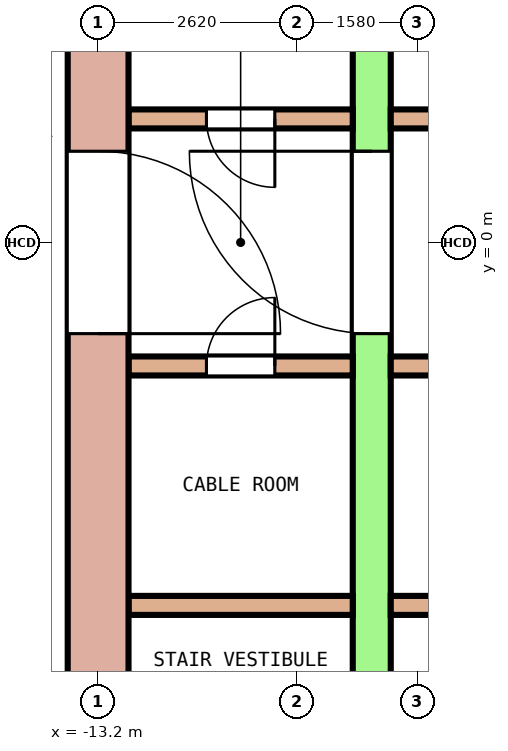
"""IFC4 building model, lengths in metres.
Left out: names, types, materials, properties, quantities, classifications, styles, units other than length and angle.
Written with IfcOpenShell. Run it as: python <this file> out.ifc"""

import sys

from ifc_helpers import new_model, si_unit, direction, frame, frame_2d, origin, place, context, subcontext, project, spatial, rectangle, extrude, element, fill, save


model = new_model("IFC4")
c1 = context("Model", 3, precision=1e-05, world=origin(), true_north=direction((0.0, 1.0)))
c2 = subcontext(c1, "Body", "Model", "MODEL_VIEW")
j1 = project(units=[si_unit("LENGTHUNIT", "METRE"), si_unit("PLANEANGLEUNIT", "RADIAN")], contexts=[c1])
p1 = place(None, origin())
s1 = spatial("IfcSite", under=j1, at=p1, CompositionType="ELEMENT")
p2 = place(p1, origin())
s2 = spatial("IfcBuilding", under=s1, at=p2, CompositionType="ELEMENT")
p3 = place(p2, frame((0.0, 0.0, 135.2)))
s3 = spatial("IfcBuildingStorey", under=s2, at=p3, CompositionType="ELEMENT", Elevation=135.2)
p4 = place(p3, frame((-13.2, -7.7, 0.0), z_axis=(0.0, 0.0, 1.0), x_axis=(0.0, 1.0, 0.0)))
e1 = element("IfcWall", 1, at=p4, inside=s3, PredefinedType="SHEAR", context=c2, shape_type="SweptSolid", body=[
    extrude(rectangle(XDim=15.4, YDim=0.8, at=frame_2d((7.7, 0.0))), origin(), (0.0, 0.0, 1.0), 4.1),
])
p5 = place(p4, frame((6.5, 0.0, 0.0)))
e2 = element("IfcOpeningElement", 2, at=p5, cuts=e1, PredefinedType="OPENING", context=c2, shape_type="SweptSolid", body=[
    extrude(rectangle(XDim=2.4, YDim=2.1, at=frame_2d((1.2, 1.05))), frame((0.0, 0.41, 0.0), z_axis=(0.0, -1.0, 0.0), x_axis=(1.0, 0.0, 0.0)), (0.0, 0.0, 1.0), 0.82),
])
p6 = place(p4, frame((13.4, 0.0, 0.0)))
e3 = element("IfcOpeningElement", 3, at=p6, cuts=e1, PredefinedType="OPENING", context=c2, shape_type="SweptSolid", body=[
    extrude(rectangle(XDim=1.2, YDim=2.1, at=frame_2d((0.6, 1.05))), frame((0.0, 0.41, 0.0), z_axis=(0.0, -1.0, 0.0), x_axis=(1.0, 0.0, 0.0)), (0.0, 0.0, 1.0), 0.82),
])
p7 = place(p4, frame((0.8, 0.0, 0.0)))
e4 = element("IfcOpeningElement", 4, at=p7, cuts=e1, PredefinedType="OPENING", context=c2, shape_type="SweptSolid", body=[
    extrude(rectangle(XDim=1.2, YDim=2.1, at=frame_2d((0.6, 1.05))), frame((0.0, 0.41, 0.0), z_axis=(0.0, -1.0, 0.0), x_axis=(1.0, 0.0, 0.0)), (0.0, 0.0, 1.0), 0.82),
])
p8 = place(p3, frame((-9.6, -7.7, 0.0), z_axis=(0.0, 0.0, 1.0), x_axis=(0.0, 1.0, 0.0)))
e5 = element("IfcWall", 5, at=p8, inside=s3, PredefinedType="SHEAR", context=c2, shape_type="SweptSolid", body=[
    extrude(rectangle(XDim=15.4, YDim=0.5, at=frame_2d((7.7, 0.0))), origin(), (0.0, 0.0, 1.0), 4.1),
])
p9 = place(p8, frame((6.5, 0.0, 0.0)))
e6 = element("IfcOpeningElement", 6, at=p9, cuts=e5, PredefinedType="OPENING", context=c2, shape_type="SweptSolid", body=[
    extrude(rectangle(XDim=2.4, YDim=2.1, at=frame_2d((1.2, 1.05))), frame((0.0, 0.26, 0.0), z_axis=(0.0, -1.0, 0.0), x_axis=(1.0, 0.0, 0.0)), (0.0, 0.0, 1.0), 0.52),
])
p10 = place(p8, frame((13.4, 0.0, 0.0)))
e7 = element("IfcOpeningElement", 7, at=p10, cuts=e5, PredefinedType="OPENING", context=c2, shape_type="SweptSolid", body=[
    extrude(rectangle(XDim=1.2, YDim=2.1, at=frame_2d((0.6, 1.05))), frame((0.0, 0.26, 0.0), z_axis=(0.0, -1.0, 0.0), x_axis=(1.0, 0.0, 0.0)), (0.0, 0.0, 1.0), 0.52),
])
p11 = place(p8, frame((0.8, 0.0, 0.0)))
e8 = element("IfcOpeningElement", 8, at=p11, cuts=e5, PredefinedType="OPENING", context=c2, shape_type="SweptSolid", body=[
    extrude(rectangle(XDim=1.2, YDim=2.1, at=frame_2d((0.6, 1.05))), frame((0.0, 0.26, 0.0), z_axis=(0.0, -1.0, 0.0), x_axis=(1.0, 0.0, 0.0)), (0.0, 0.0, 1.0), 0.52),
])
p12 = place(p3, frame((-12.8, 1.625, 0.0), z_axis=(0.0, 0.0, 1.0), x_axis=(1.0, 0.0, 0.0)))
e9 = element("IfcWall", 9, at=p12, inside=s3, PredefinedType="SOLIDWALL", context=c2, shape_type="SweptSolid", body=[
    extrude(rectangle(XDim=2.95, YDim=0.25, at=frame_2d((1.475, 0.0))), origin(), (0.0, 0.0, 1.0), 4.1),
])
p13 = place(p12, frame((1.025, 0.0, 0.0)))
e10 = element("IfcOpeningElement", 10, at=p13, cuts=e9, PredefinedType="OPENING", context=c2, shape_type="SweptSolid", body=[
    extrude(rectangle(XDim=0.9, YDim=2.1, at=frame_2d((0.45, 1.05))), frame((0.0, 0.135, 0.0), z_axis=(0.0, -1.0, 0.0), x_axis=(1.0, 0.0, 0.0)), (0.0, 0.0, 1.0), 0.27),
])
p14 = place(p3, frame((-9.35, 1.625, 0.0), z_axis=(0.0, 0.0, 1.0), x_axis=(1.0, 0.0, 0.0)))
e11 = element("IfcWall", 11, at=p14, inside=s3, PredefinedType="SOLIDWALL", context=c2, shape_type="SweptSolid", body=[
    extrude(rectangle(XDim=18.7, YDim=0.25, at=frame_2d((9.35, 0.0))), origin(), (0.0, 0.0, 1.0), 4.1),
])
p15 = place(p14, frame((2.85, 0.0, 0.0)))
e12 = element("IfcOpeningElement", 12, at=p15, cuts=e11, PredefinedType="OPENING", context=c2, shape_type="SweptSolid", body=[
    extrude(rectangle(XDim=1.1, YDim=2.1, at=frame_2d((0.55, 1.05))), frame((0.0, 0.135, 0.0), z_axis=(0.0, -1.0, 0.0), x_axis=(1.0, 0.0, 0.0)), (0.0, 0.0, 1.0), 0.27),
])
p16 = place(p14, frame((5.15, 0.0, 0.0)))
e13 = element("IfcOpeningElement", 13, at=p16, cuts=e11, PredefinedType="OPENING", context=c2, shape_type="SweptSolid", body=[
    extrude(rectangle(XDim=1.1, YDim=2.1, at=frame_2d((0.55, 1.05))), frame((0.0, 0.135, 0.0), z_axis=(0.0, -1.0, 0.0), x_axis=(1.0, 0.0, 0.0)), (0.0, 0.0, 1.0), 0.27),
])
p17 = place(p14, frame((14.8, 0.0, 0.0)))
e14 = element("IfcOpeningElement", 14, at=p17, cuts=e11, PredefinedType="OPENING", context=c2, shape_type="SweptSolid", body=[
    extrude(rectangle(XDim=1.1, YDim=2.1, at=frame_2d((0.55, 1.05))), frame((0.0, 0.135, 0.0), z_axis=(0.0, -1.0, 0.0), x_axis=(1.0, 0.0, 0.0)), (0.0, 0.0, 1.0), 0.27),
])
p18 = place(p14, frame((0.575, 0.0, 0.0)))
e15 = element("IfcOpeningElement", 15, at=p18, cuts=e11, PredefinedType="OPENING", context=c2, shape_type="SweptSolid", body=[
    extrude(rectangle(XDim=0.9, YDim=2.1, at=frame_2d((0.45, 1.05))), frame((0.0, 0.135, 0.0), z_axis=(0.0, -1.0, 0.0), x_axis=(1.0, 0.0, 0.0)), (0.0, 0.0, 1.0), 0.27),
])
p19 = place(p14, frame((17.225, 0.0, 0.0)))
e16 = element("IfcOpeningElement", 16, at=p19, cuts=e11, PredefinedType="OPENING", context=c2, shape_type="SweptSolid", body=[
    extrude(rectangle(XDim=0.9, YDim=2.1, at=frame_2d((0.45, 1.05))), frame((0.0, 0.135, 0.0), z_axis=(0.0, -1.0, 0.0), x_axis=(1.0, 0.0, 0.0)), (0.0, 0.0, 1.0), 0.27),
])
p20 = place(p3, frame((-12.8, -1.625, 0.0), z_axis=(0.0, 0.0, 1.0), x_axis=(1.0, 0.0, 0.0)))
e17 = element("IfcWall", 17, at=p20, inside=s3, PredefinedType="SOLIDWALL", context=c2, shape_type="SweptSolid", body=[
    extrude(rectangle(XDim=2.95, YDim=0.25, at=frame_2d((1.475, 0.0))), origin(), (0.0, 0.0, 1.0), 4.1),
])
p21 = place(p20, frame((1.025, 0.0, 0.0)))
e18 = element("IfcOpeningElement", 18, at=p21, cuts=e17, PredefinedType="OPENING", context=c2, shape_type="SweptSolid", body=[
    extrude(rectangle(XDim=0.9, YDim=2.1, at=frame_2d((0.45, 1.05))), frame((0.0, 0.135, 0.0), z_axis=(0.0, -1.0, 0.0), x_axis=(1.0, 0.0, 0.0)), (0.0, 0.0, 1.0), 0.27),
])
p22 = place(p3, frame((-9.35, -1.625, 0.0), z_axis=(0.0, 0.0, 1.0), x_axis=(1.0, 0.0, 0.0)))
e19 = element("IfcWall", 19, at=p22, inside=s3, PredefinedType="SOLIDWALL", context=c2, shape_type="SweptSolid", body=[
    extrude(rectangle(XDim=18.7, YDim=0.25, at=frame_2d((9.35, 0.0))), origin(), (0.0, 0.0, 1.0), 4.1),
])
p23 = place(p22, frame((2.85, 0.0, 0.0)))
e20 = element("IfcOpeningElement", 20, at=p23, cuts=e19, PredefinedType="OPENING", context=c2, shape_type="SweptSolid", body=[
    extrude(rectangle(XDim=1.1, YDim=2.1, at=frame_2d((0.55, 1.05))), frame((0.0, 0.135, 0.0), z_axis=(0.0, -1.0, 0.0), x_axis=(1.0, 0.0, 0.0)), (0.0, 0.0, 1.0), 0.27),
])
p24 = place(p22, frame((5.15, 0.0, 0.0)))
e21 = element("IfcOpeningElement", 21, at=p24, cuts=e19, PredefinedType="OPENING", context=c2, shape_type="SweptSolid", body=[
    extrude(rectangle(XDim=1.1, YDim=2.1, at=frame_2d((0.55, 1.05))), frame((0.0, 0.135, 0.0), z_axis=(0.0, -1.0, 0.0), x_axis=(1.0, 0.0, 0.0)), (0.0, 0.0, 1.0), 0.27),
])
p25 = place(p22, frame((14.8, 0.0, 0.0)))
e22 = element("IfcOpeningElement", 22, at=p25, cuts=e19, PredefinedType="OPENING", context=c2, shape_type="SweptSolid", body=[
    extrude(rectangle(XDim=1.1, YDim=2.1, at=frame_2d((0.55, 1.05))), frame((0.0, 0.135, 0.0), z_axis=(0.0, -1.0, 0.0), x_axis=(1.0, 0.0, 0.0)), (0.0, 0.0, 1.0), 0.27),
])
p26 = place(p22, frame((0.575, 0.0, 0.0)))
e23 = element("IfcOpeningElement", 23, at=p26, cuts=e19, PredefinedType="OPENING", context=c2, shape_type="SweptSolid", body=[
    extrude(rectangle(XDim=0.9, YDim=2.1, at=frame_2d((0.45, 1.05))), frame((0.0, 0.135, 0.0), z_axis=(0.0, -1.0, 0.0), x_axis=(1.0, 0.0, 0.0)), (0.0, 0.0, 1.0), 0.27),
])
p27 = place(p22, frame((17.225, 0.0, 0.0)))
e24 = element("IfcOpeningElement", 24, at=p27, cuts=e19, PredefinedType="OPENING", context=c2, shape_type="SweptSolid", body=[
    extrude(rectangle(XDim=0.9, YDim=2.1, at=frame_2d((0.45, 1.05))), frame((0.0, 0.135, 0.0), z_axis=(0.0, -1.0, 0.0), x_axis=(1.0, 0.0, 0.0)), (0.0, 0.0, 1.0), 0.27),
])
p28 = place(p3, frame((-12.8, -4.775, 0.0), z_axis=(0.0, 0.0, 1.0), x_axis=(1.0, 0.0, 0.0)))
e25 = element("IfcWall", 25, at=p28, inside=s3, PredefinedType="SOLIDWALL", context=c2, shape_type="SweptSolid", body=[
    extrude(rectangle(XDim=2.95, YDim=0.25, at=frame_2d((1.475, 0.0))), origin(), (0.0, 0.0, 1.0), 4.1),
])
p29 = place(p3, frame((-9.35, -4.775, 0.0), z_axis=(0.0, 0.0, 1.0), x_axis=(1.0, 0.0, 0.0)))
e26 = element("IfcWall", 26, at=p29, inside=s3, PredefinedType="SOLIDWALL", context=c2, shape_type="SweptSolid", body=[
    extrude(rectangle(XDim=18.7, YDim=0.25, at=frame_2d((9.35, 0.0))), origin(), (0.0, 0.0, 1.0), 4.1),
])
p30 = place(p9, origin())
e27 = element("IfcDoor", 27, at=p30, inside=s3, OperationType="DOUBLE_DOOR_SINGLE_SWING", PredefinedType="DOOR", context=c2, shape_type="SweptSolid", body=[
    extrude(rectangle(XDim=2.4, YDim=2.1, at=frame_2d((1.2, 1.05))), frame((0.0, 0.2, 0.0), z_axis=(0.0, -1.0, 0.0), x_axis=(1.0, 0.0, 0.0)), (0.0, 0.0, 1.0), 0.4),
])
fill(e6, e27)
p31 = place(p5, origin())
e28 = element("IfcDoor", 28, at=p31, inside=s3, OperationType="DOUBLE_DOOR_SINGLE_SWING", PredefinedType="DOOR", context=c2, shape_type="SweptSolid", body=[
    extrude(rectangle(XDim=2.4, YDim=2.1, at=frame_2d((1.2, 1.05))), frame((0.0, 0.3, 0.0), z_axis=(0.0, -1.0, 0.0), x_axis=(1.0, 0.0, 0.0)), (0.0, 0.0, 1.0), 0.6),
])
fill(e2, e28)
p32 = place(p13, origin())
e29 = element("IfcDoor", 29, at=p32, inside=s3, OperationType="SINGLE_SWING_RIGHT", PredefinedType="DOOR", context=c2, shape_type="SweptSolid", body=[
    extrude(rectangle(XDim=0.9, YDim=2.1, at=frame_2d((0.45, 1.05))), frame((0.0, 0.075, 0.0), z_axis=(0.0, -1.0, 0.0), x_axis=(1.0, 0.0, 0.0)), (0.0, 0.0, 1.0), 0.15),
])
fill(e10, e29)
p33 = place(p21, origin())
e30 = element("IfcDoor", 30, at=p33, inside=s3, OperationType="SINGLE_SWING_RIGHT", PredefinedType="DOOR", context=c2, shape_type="SweptSolid", body=[
    extrude(rectangle(XDim=0.9, YDim=2.1, at=frame_2d((0.45, 1.05))), frame((0.0, 0.075, 0.0), z_axis=(0.0, -1.0, 0.0), x_axis=(1.0, 0.0, 0.0)), (0.0, 0.0, 1.0), 0.15),
])
fill(e18, e30)
save(model, sys.argv[1])
